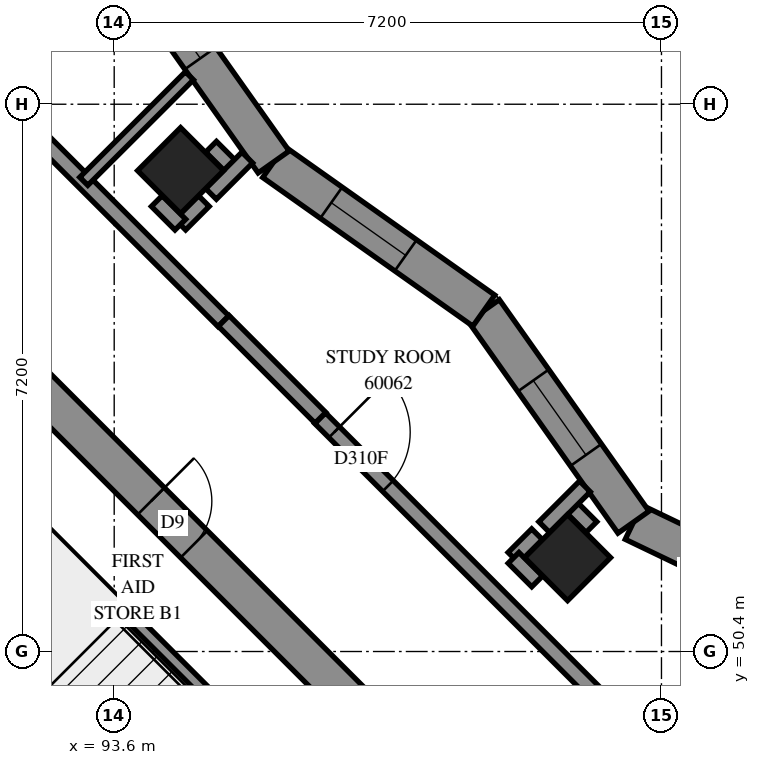
"""IFC4 building model, lengths in metres.
Left out: names, types, materials, properties, quantities, classifications, styles, units other than length and angle.
Written with IfcOpenShell. Run it as: python <this file> out.ifc"""

import sys

from ifc_helpers import new_model, si_unit, direction, frame, frame_2d, origin, origin_2d, place, context, subcontext, project, spatial, polyline, rectangle, outline, extrude, element, fill, save


model = new_model("IFC4")
c1 = context("Model", 3, precision=1e-05, world=origin(), true_north=direction((0.0, 1.0)))
c2 = subcontext(c1, "Body", "Model", "MODEL_VIEW")
j1 = project(units=[si_unit("LENGTHUNIT", "METRE"), si_unit("PLANEANGLEUNIT", "RADIAN")], contexts=[c1])
p1 = place(None, origin())
s1 = spatial("IfcSite", under=j1, at=p1, CompositionType="ELEMENT")
p2 = place(p1, origin())
s2 = spatial("IfcBuilding", under=s1, at=p2, CompositionType="ELEMENT")
p3 = place(p2, frame((0.0, 0.0, 220.2)))
s3 = spatial("IfcBuildingStorey", under=s2, at=p3, CompositionType="ELEMENT", Elevation=220.2)
for number, where, z_axis, x_axis in (
    (1, (94.474, 56.727, 0.0), (0.0, 0.0, 1.0), (0.707, -0.707, 0.0)),
    (2, (99.565, 51.635, 0.0), (0.0, 0.0, 1.0), (0.707, -0.707, 0.0)),
):
    element("IfcColumn", number, at=place(p3, frame(where, z_axis=z_axis, x_axis=x_axis)), inside=s3, PredefinedType="COLUMN", context=c2, shape_type="SweptSolid", body=[
        extrude(rectangle(XDim=0.8, YDim=0.8, at=origin_2d()), origin(), (0.0, 0.0, 1.0), 3.1),
    ])
p4 = place(p3, frame((86.66, 59.802, -0.3), z_axis=(0.0, 0.0, 1.0), x_axis=(0.7071067812, -0.7071067812, 0.0)))
e3 = element("IfcWall", 3, at=p4, inside=s3, PredefinedType="SHEAR", context=c2, shape_type="SweptSolid", body=[
    extrude(rectangle(XDim=15.4, YDim=0.5, at=frame_2d((7.7, 0.0))), origin(), (0.0, 0.0, 1.0), 2.7),
])
p5 = place(p4, frame((10.5, 0.0, 0.3)))
e4 = element("IfcOpeningElement", 4, at=p5, cuts=e3, PredefinedType="OPENING", context=c2, shape_type="SweptSolid", body=[
    extrude(rectangle(XDim=0.8, YDim=2.1, at=frame_2d((0.4, 1.05))), frame((0.0, 0.26, 0.0), z_axis=(0.0, -1.0, 0.0), x_axis=(1.0, 0.0, 0.0)), (0.0, 0.0, 1.0), 0.52),
])
p6 = place(p3, frame((88.958, 51.211, 0.0), z_axis=(0.0, 0.0, 1.0), x_axis=(0.7070998367, -0.7071137256, 0.0)))
e5 = element("IfcWall", 5, at=p6, inside=s3, PredefinedType="SOLIDWALL", context=c2, shape_type="SweptSolid", body=[
    extrude(rectangle(XDim=7.2, YDim=0.3, at=frame_2d((3.6, 0.0))), origin(), (0.0, 0.0, 1.0), 3.1),
])
p7 = place(p3, frame((99.211, 46.544, 0.0), z_axis=(0.0, 0.0, 1.0), x_axis=(0.7071067812, 0.7071067812, 0.0)))
e6 = element("IfcWall", 6, at=p7, inside=s3, PredefinedType="SOLIDWALL", context=c2, shape_type="SweptSolid", body=[
    extrude(outline(polyline([(0.25, -0.25), (6.222, -0.25), (5.516, 0.25), (-0.25, 0.25), (0.25, -0.25)])), origin(), (0.0, 0.0, 1.0), 3.1),
])
p8 = place(p7, frame((0.925, 0.0, 0.6)))
e7 = element("IfcOpeningElement", 7, at=p8, cuts=e6, PredefinedType="OPENING", context=c2, shape_type="SweptSolid", body=[
    extrude(rectangle(XDim=1.8, YDim=1.9, at=frame_2d((0.9, 0.95))), frame((0.0, 0.26, 0.0), z_axis=(0.0, -1.0, 0.0), x_axis=(1.0, 0.0, 0.0)), (0.0, 0.0, 1.0), 0.52),
])
p9 = place(p7, frame((3.983, 0.0, 0.6)))
e8 = element("IfcOpeningElement", 8, at=p9, cuts=e6, PredefinedType="OPENING", context=c2, shape_type="SweptSolid", body=[
    extrude(rectangle(XDim=1.2, YDim=1.9, at=frame_2d((0.6, 0.95))), frame((0.0, 0.26, 0.0), z_axis=(0.0, -1.0, 0.0), x_axis=(1.0, 0.0, 0.0)), (0.0, 0.0, 1.0), 0.52),
])
p10 = place(p3, frame((103.361, 50.694, 0.0), z_axis=(0.0, 0.0, 1.0), x_axis=(-0.9014217251, 0.4329421133, 0.0)))
e9 = element("IfcWall", 9, at=p10, inside=s3, PredefinedType="SOLIDWALL", context=c2, shape_type="SweptSolid", body=[
    extrude(outline(polyline([(-0.353, -0.25), (3.185, -0.25), (3.315, 0.25), (0.353, 0.25), (-0.353, -0.25)])), origin(), (0.0, 0.0, 1.0), 3.1),
])
p11 = place(p10, frame((1.201, 0.0, 0.45)))
e10 = element("IfcOpeningElement", 10, at=p11, cuts=e9, PredefinedType="OPENING", context=c2, shape_type="SweptSolid", body=[
    extrude(rectangle(XDim=1.2, YDim=2.5, at=frame_2d((0.6, 1.25))), frame((0.0, 0.26, 0.0), z_axis=(0.0, -1.0, 0.0), x_axis=(1.0, 0.0, 0.0)), (0.0, 0.0, 1.0), 0.52),
])
p12 = place(p3, frame((100.432, 52.102, 0.0), z_axis=(0.0, 0.0, 1.0), x_axis=(-0.5775248088, 0.8163731348, 0.0)))
e11 = element("IfcWall", 11, at=p12, inside=s3, PredefinedType="SOLIDWALL", context=c2, shape_type="SweptSolid", body=[
    extrude(outline(polyline([(0.065, -0.25), (3.452, -0.25), (3.366, 0.25), (-0.065, 0.25), (0.065, -0.25)])), origin(), (0.0, 0.0, 1.0), 3.1),
])
p13 = place(p12, frame((1.083, 0.0, 0.45)))
e12 = element("IfcOpeningElement", 12, at=p13, cuts=e11, PredefinedType="OPENING", context=c2, shape_type="SweptSolid", body=[
    extrude(rectangle(XDim=1.2, YDim=2.5, at=frame_2d((0.6, 1.25))), frame((0.0, 0.26, 0.0), z_axis=(0.0, -1.0, 0.0), x_axis=(1.0, 0.0, 0.0)), (0.0, 0.0, 1.0), 0.52),
])
p14 = place(p3, frame((98.463, 54.884, 0.0), z_axis=(0.0, 0.0, 1.0), x_axis=(-0.8163684441, 0.5775314394, 0.0)))
e13 = element("IfcWall", 13, at=p14, inside=s3, PredefinedType="SOLIDWALL", context=c2, shape_type="SweptSolid", body=[
    extrude(outline(polyline([(-0.043, -0.25), (3.344, -0.25), (3.43, 0.25), (0.043, 0.25), (-0.043, -0.25)])), origin(), (0.0, 0.0, 1.0), 3.1),
])
p15 = place(p14, frame((1.259, 0.0, 0.45)))
e14 = element("IfcOpeningElement", 14, at=p15, cuts=e13, PredefinedType="OPENING", context=c2, shape_type="SweptSolid", body=[
    extrude(rectangle(XDim=1.2, YDim=2.5, at=frame_2d((0.6, 1.25))), frame((0.0, 0.26, 0.0), z_axis=(0.0, -1.0, 0.0), x_axis=(1.0, 0.0, 0.0)), (0.0, 0.0, 1.0), 0.52),
])
p16 = place(p3, frame((95.698, 56.84, 0.0), z_axis=(0.0, 0.0, 1.0), x_axis=(-0.5775371961, 0.8163643715, 0.0)))
e15 = element("IfcWall", 15, at=p16, inside=s3, PredefinedType="SOLIDWALL", context=c2, shape_type="SweptSolid", body=[
    extrude(outline(polyline([(0.043, -0.25), (3.43, -0.25), (3.344, 0.25), (-0.043, 0.25), (0.043, -0.25)])), origin(), (0.0, 0.0, 1.0), 3.1),
])
p17 = place(p16, frame((1.67, 0.0, 0.45)))
e16 = element("IfcOpeningElement", 16, at=p17, cuts=e15, PredefinedType="OPENING", context=c2, shape_type="SweptSolid", body=[
    extrude(rectangle(XDim=1.2, YDim=2.5, at=frame_2d((0.6, 1.25))), frame((0.0, 0.26, 0.0), z_axis=(0.0, -1.0, 0.0), x_axis=(1.0, 0.0, 0.0)), (0.0, 0.0, 1.0), 0.52),
])
p18 = place(p3, frame((91.313, 53.354, 0.0), z_axis=(0.0, 0.0, 1.0), x_axis=(0.7071147811, -0.7070987812, 0.0)))
e17 = element("IfcWall", 17, at=p18, inside=s3, PredefinedType="PARTITIONING", context=c2, shape_type="SweptSolid", body=[
    extrude(rectangle(XDim=6.25, YDim=0.15, at=frame_2d((3.125, 0.0))), origin(), (0.0, 0.0, 1.0), 3.1),
])
p19 = place(p3, frame((86.835, 62.945, 0.0), z_axis=(0.0, 0.0, 1.0), x_axis=(0.7072533434, -0.7069601886, 0.0)))
e18 = element("IfcWall", 18, at=p19, inside=s3, PredefinedType="PARTITIONING", context=c2, shape_type="SweptSolid", body=[
    extrude(rectangle(XDim=11.598, YDim=0.2, at=frame_2d((5.799, 0.0))), origin(), (0.0, 0.0, 1.0), 3.1),
])
p20 = place(p19, frame((3.156, 0.0, 0.0)))
e19 = element("IfcOpeningElement", 19, at=p20, cuts=e18, PredefinedType="OPENING", context=c2, shape_type="SweptSolid", body=[
    extrude(rectangle(XDim=0.9, YDim=2.1, at=frame_2d((0.45, 1.05))), frame((0.0, 0.11, 0.0), z_axis=(0.0, -1.0, 0.0), x_axis=(1.0, 0.0, 0.0)), (0.0, 0.0, 1.0), 0.22),
])
p21 = place(p3, frame((96.309, 53.471, 0.0), z_axis=(0.0, 0.0, 1.0), x_axis=(0.7071067812, -0.7071067812, 0.0)))
e20 = element("IfcWall", 20, at=p21, inside=s3, PredefinedType="PARTITIONING", context=c2, shape_type="SweptSolid", body=[
    extrude(rectangle(XDim=6.2, YDim=0.2, at=frame_2d((3.1, 0.0))), origin(), (0.0, 0.0, 1.0), 3.1),
])
p22 = place(p21, frame((0.263, 0.0, 0.0)))
e21 = element("IfcOpeningElement", 21, at=p22, cuts=e20, PredefinedType="OPENING", context=c2, shape_type="SweptSolid", body=[
    extrude(rectangle(XDim=1.0, YDim=2.1, at=frame_2d((0.5, 1.05))), frame((0.0, 0.11, 0.0), z_axis=(0.0, -1.0, 0.0), x_axis=(1.0, 0.0, 0.0)), (0.0, 0.0, 1.0), 0.22),
])
p23 = place(p3, frame((91.857, 57.929, 0.0), z_axis=(0.0, 0.0, 1.0), x_axis=(0.7066823676, 0.7075309402, 0.0)))
e22 = element("IfcWall", 22, at=p23, inside=s3, PredefinedType="PARTITIONING", context=c2, shape_type="SweptSolid", body=[
    extrude(rectangle(XDim=2.239, YDim=0.15, at=frame_2d((1.12, 0.0))), origin(), (0.0, 0.0, 1.0), 3.1),
])
p24 = place(p23, frame((1.133, 0.0, 0.0)))
e23 = element("IfcOpeningElement", 23, at=p24, cuts=e22, PredefinedType="OPENING", context=c2, shape_type="SweptSolid", body=[
    extrude(rectangle(XDim=0.8, YDim=2.1, at=frame_2d((0.4, 1.05))), frame((0.0, 0.085, 0.0), z_axis=(0.0, -1.0, 0.0), x_axis=(1.0, 0.0, 0.0)), (0.0, 0.0, 1.0), 0.17),
])
p25 = place(p3, frame((93.2, 56.586, 0.0), z_axis=(0.0, 0.0, 1.0), x_axis=(0.7076411282, 0.7065720301, 0.0)))
e24 = element("IfcWall", 24, at=p25, inside=s3, PredefinedType="PARTITIONING", context=c2, shape_type="SweptSolid", body=[
    extrude(rectangle(XDim=1.964, YDim=0.15, at=frame_2d((0.982, 0.0))), origin(), (0.0, 0.0, 1.0), 3.1),
])
p26 = place(p3, frame((95.041, 54.749, 0.0), z_axis=(0.0, 0.0, 1.0), x_axis=(0.7065510983, -0.7076620277, 0.0)))
e25 = element("IfcWall", 25, at=p26, inside=s3, PredefinedType="PARTITIONING", context=c2, shape_type="SweptSolid", body=[
    extrude(rectangle(XDim=1.8, YDim=0.2, at=frame_2d((0.9, 0.0))), origin(), (0.0, 0.0, 1.0), 3.1),
])
for number, where, z_axis, x_axis in (
    (26, (98.853, 51.633, 0.0), (0.0, 0.0, 1.0), (0.707, 0.707, 0.0)),
    (27, (94.469, 56.017, 0.0), (0.0, 0.0, 1.0), (0.707, 0.707, 0.0)),
    (28, (98.854, 51.632, 0.0), (0.0, 0.0, 1.0), (0.707, -0.707, 0.0)),
    (29, (99.568, 52.346, 0.0), (0.0, 0.0, 1.0), (0.707, -0.707, 0.0)),
):
    element("IfcWall", number, at=place(p3, frame(where, z_axis=z_axis, x_axis=x_axis)), inside=s3, PredefinedType="PARTITIONING", context=c2, shape_type="SweptSolid", body=[
        extrude(rectangle(XDim=0.438, YDim=0.2, at=frame_2d((0.219, 0.0))), origin(), (0.0, 0.0, 1.0), 3.1),
    ])
p27 = place(p3, frame((94.874, 57.04, 0.0), z_axis=(0.0, 0.0, 1.0), x_axis=(0.7071067812, -0.7071067812, 0.0)))
e30 = element("IfcWall", 30, at=p27, inside=s3, PredefinedType="PARTITIONING", context=c2, shape_type="SweptSolid", body=[
    extrude(rectangle(XDim=0.408, YDim=0.2, at=frame_2d((0.204, 0.0))), origin(), (0.0, 0.0, 1.0), 3.1),
])
p28 = place(p3, frame((94.16, 56.326, 0.0), z_axis=(0.0, 0.0, 1.0), x_axis=(0.7071067812, -0.7071067812, 0.0)))
e31 = element("IfcWall", 31, at=p28, inside=s3, PredefinedType="PARTITIONING", context=c2, shape_type="SweptSolid", body=[
    extrude(rectangle(XDim=0.438, YDim=0.2, at=frame_2d((0.219, 0.0))), origin(), (0.0, 0.0, 1.0), 3.1),
])
p29 = place(p3, frame((94.873, 56.421, 0.0), z_axis=(0.0, 0.0, 1.0), x_axis=(0.7071808122, 0.7070327425, 0.0)))
e32 = element("IfcWall", 32, at=p29, inside=s3, PredefinedType="PARTITIONING", context=c2, shape_type="SweptSolid", body=[
    extrude(rectangle(XDim=0.675, YDim=0.2, at=frame_2d((0.338, 0.0))), origin(), (0.0, 0.0, 1.0), 3.1),
])
p30 = place(p3, frame((99.257, 52.037, 0.0), z_axis=(0.0, 0.0, 1.0), x_axis=(0.7071067812, 0.7071067812, 0.0)))
e33 = element("IfcWall", 33, at=p30, inside=s3, PredefinedType="PARTITIONING", context=c2, shape_type="SweptSolid", body=[
    extrude(rectangle(XDim=0.757, YDim=0.2, at=frame_2d((0.379, 0.0))), origin(), (0.0, 0.0, 1.0), 3.1),
])
p31 = place(p13, origin())
e34 = element("IfcWindow", 34, at=p31, inside=s3, PartitioningType="SINGLE_PANEL", PredefinedType="WINDOW", context=c2, shape_type="SweptSolid", body=[
    extrude(rectangle(XDim=1.2, YDim=2.5, at=frame_2d((0.6, 1.25))), frame((0.0, 0.18, 0.0), z_axis=(0.0, -1.0, 0.0), x_axis=(1.0, 0.0, 0.0)), (0.0, 0.0, 1.0), 0.06),
])
fill(e12, e34)
p32 = place(p15, origin())
e35 = element("IfcWindow", 35, at=p32, inside=s3, PartitioningType="SINGLE_PANEL", PredefinedType="WINDOW", context=c2, shape_type="SweptSolid", body=[
    extrude(rectangle(XDim=1.2, YDim=2.5, at=frame_2d((0.6, 1.25))), frame((0.0, 0.18, 0.0), z_axis=(0.0, -1.0, 0.0), x_axis=(1.0, 0.0, 0.0)), (0.0, 0.0, 1.0), 0.06),
])
fill(e14, e35)
p33 = place(p17, origin())
e36 = element("IfcWindow", 36, at=p33, inside=s3, PartitioningType="SINGLE_PANEL", PredefinedType="WINDOW", context=c2, shape_type="SweptSolid", body=[
    extrude(rectangle(XDim=1.2, YDim=2.5, at=frame_2d((0.6, 1.25))), frame((0.0, 0.18, 0.0), z_axis=(0.0, -1.0, 0.0), x_axis=(1.0, 0.0, 0.0)), (0.0, 0.0, 1.0), 0.06),
])
fill(e16, e36)
p34 = place(p5, origin())
e37 = element("IfcDoor", 37, at=p34, inside=s3, OperationType="SINGLE_SWING_RIGHT", PredefinedType="DOOR", context=c2, shape_type="SweptSolid", body=[
    extrude(rectangle(XDim=0.8, YDim=2.1, at=frame_2d((0.4, 1.05))), frame((0.0, 0.025, 0.0), z_axis=(0.0, -1.0, 0.0), x_axis=(1.0, 0.0, 0.0)), (0.0, 0.0, 1.0), 0.05),
])
fill(e4, e37)
p35 = place(p22, origin())
e38 = element("IfcDoor", 38, at=p35, inside=s3, OperationType="SINGLE_SWING_LEFT", PredefinedType="DOOR", context=c2, shape_type="SweptSolid", body=[
    extrude(rectangle(XDim=1.0, YDim=2.1, at=frame_2d((0.5, 1.05))), frame((0.0, 0.025, 0.0), z_axis=(0.0, -1.0, 0.0), x_axis=(1.0, 0.0, 0.0)), (0.0, 0.0, 1.0), 0.05),
])
fill(e21, e38)
save(model, sys.argv[1])
